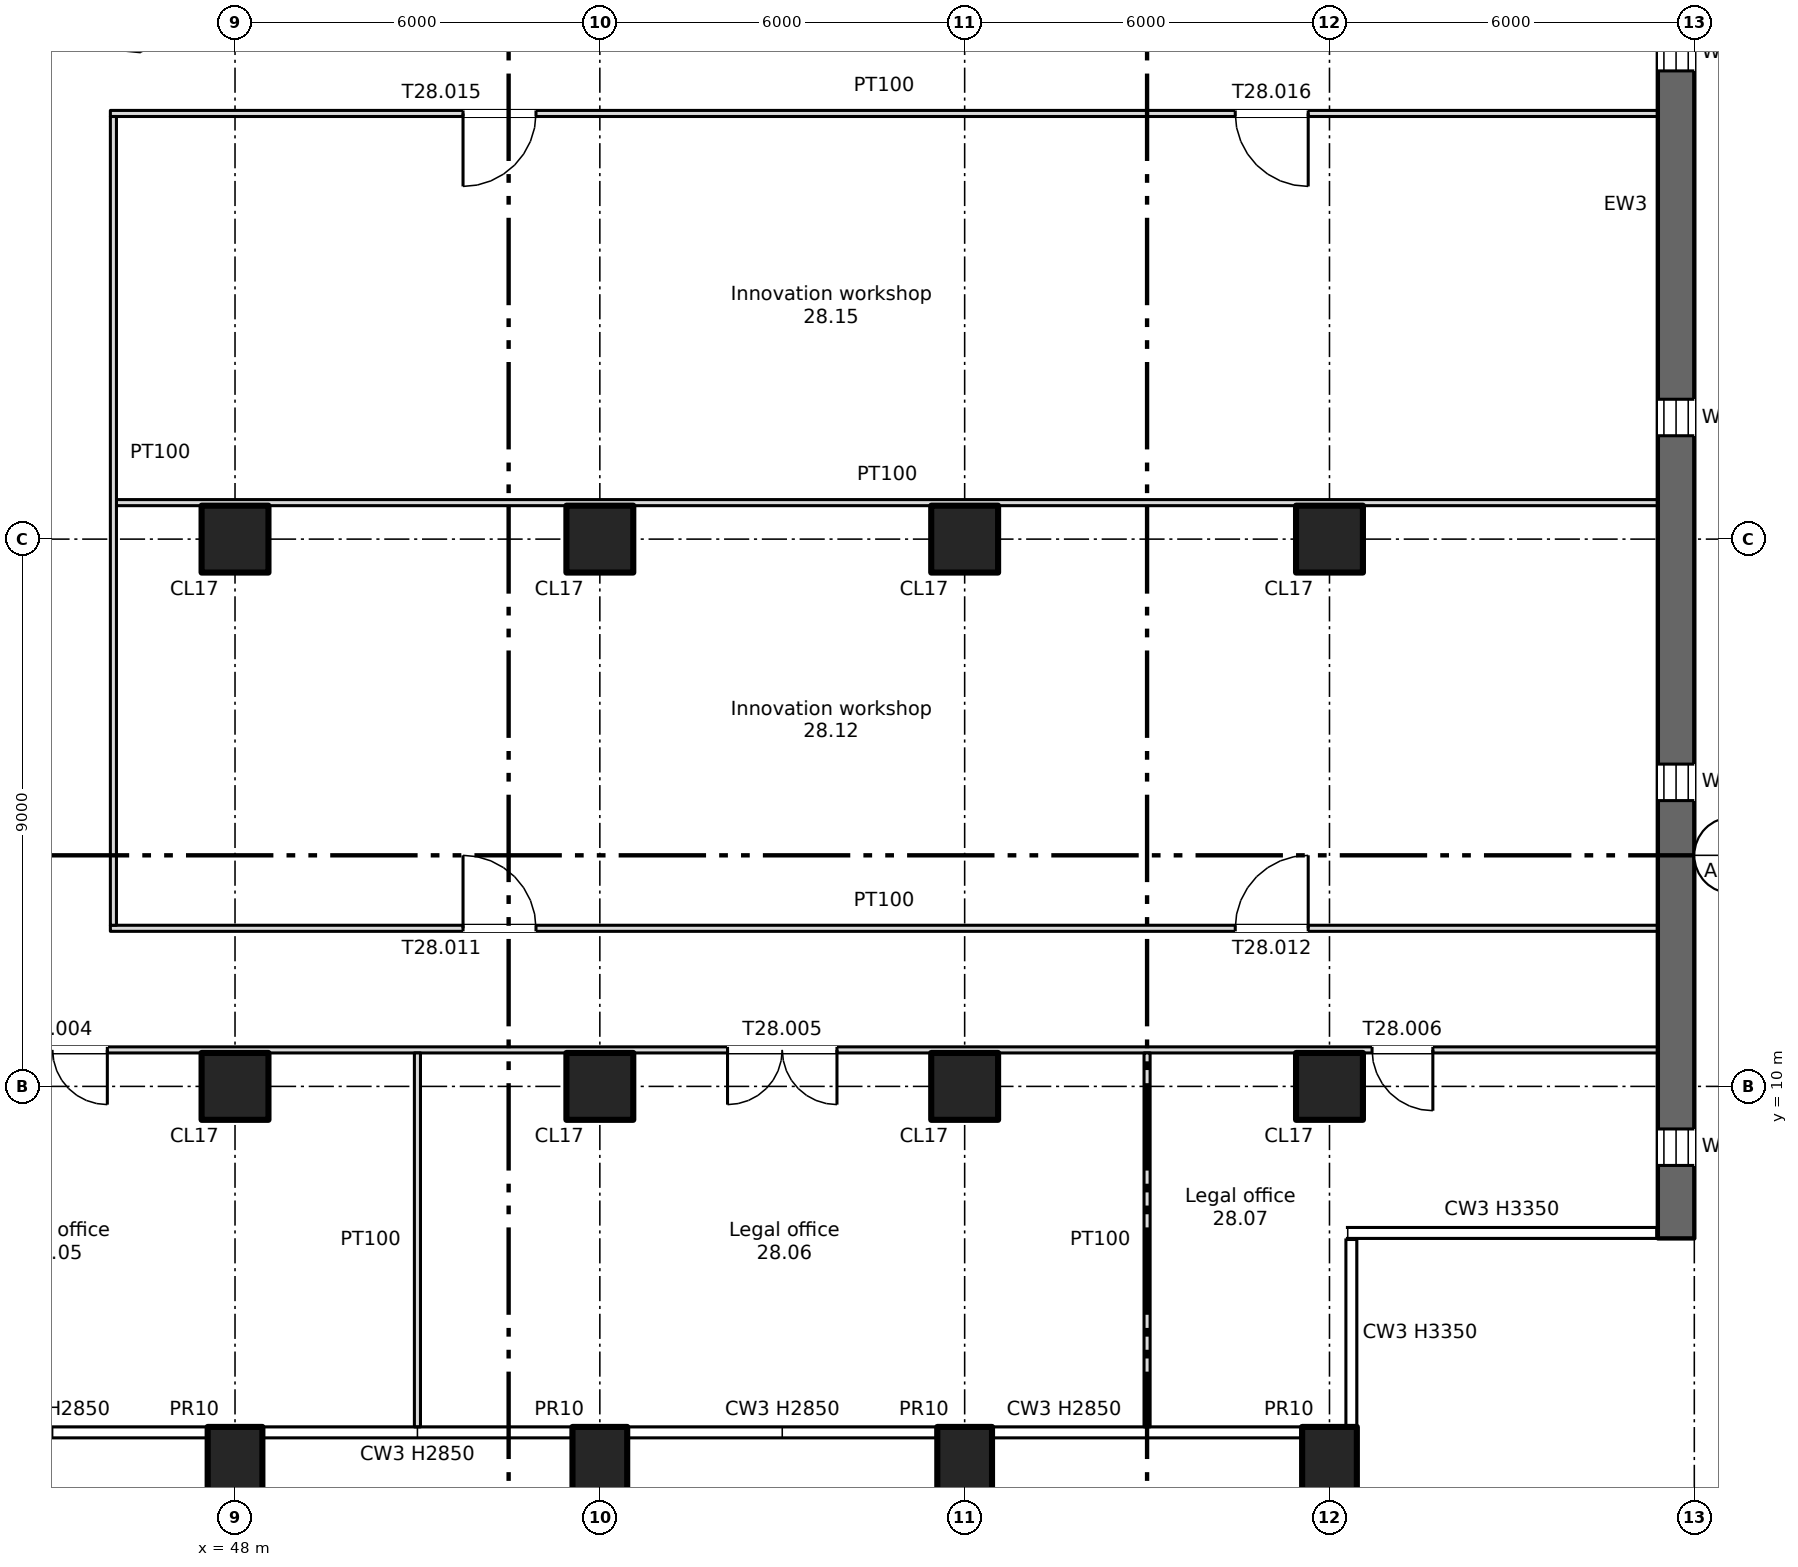
"""IFC4 building model, lengths in metres.
Left out: names, types, materials, properties, quantities, classifications, styles, units other than length and angle.
Written with IfcOpenShell. Run it as: python <this file> out.ifc"""

import sys

from ifc_helpers import new_model, si_unit, direction, frame, frame_2d, origin, origin_2d, place, context, subcontext, project, spatial, rectangle, extrude, element, fill, save


model = new_model("IFC4")
c1 = context("Model", 3, precision=1e-05, world=origin(), true_north=direction((0.0, 1.0)))
c2 = subcontext(c1, "Body", "Model", "MODEL_VIEW")
j1 = project(units=[si_unit("LENGTHUNIT", "METRE"), si_unit("PLANEANGLEUNIT", "RADIAN")], contexts=[c1])
p1 = place(None, origin())
s1 = spatial("IfcSite", under=j1, at=p1, CompositionType="ELEMENT")
p2 = place(p1, origin())
s2 = spatial("IfcBuilding", under=s1, at=p2, CompositionType="ELEMENT")
p3 = place(p2, frame((0.0, 0.0, 193.0)))
s3 = spatial("IfcBuildingStorey", under=s2, at=p3, CompositionType="ELEMENT", Elevation=193.0)
for number, where, z_axis, x_axis in (
    (1, (48.0, 3.7, -0.4), (0.0, 0.0, 1.0), (1.0, 0.0, 0.0)),
    (2, (54.0, 3.7, -0.4), (0.0, 0.0, 1.0), (1.0, 0.0, 0.0)),
    (3, (60.0, 3.7, -0.4), (0.0, 0.0, 1.0), (1.0, 0.0, 0.0)),
    (4, (66.0, 3.7, -0.4), (0.0, 0.0, 1.0), (1.0, 0.0, 0.0)),
):
    element("IfcColumn", number, at=place(p3, frame(where, z_axis=z_axis, x_axis=x_axis)), inside=s3, PredefinedType="COLUMN", context=c2, shape_type="SweptSolid", body=[
        extrude(rectangle(XDim=0.9, YDim=1.4, at=origin_2d()), origin(), (0.0, 0.0, 1.0), 3.75),
    ])
for number, where, z_axis, x_axis in (
    (5, (48.0, 10.0, 0.0), (0.0, 0.0, 1.0), (1.0, 0.0, 0.0)),
    (6, (48.0, 19.0, 0.0), (0.0, 0.0, 1.0), (1.0, 0.0, 0.0)),
    (7, (54.0, 10.0, 0.0), (0.0, 0.0, 1.0), (1.0, 0.0, 0.0)),
    (8, (54.0, 19.0, 0.0), (0.0, 0.0, 1.0), (1.0, 0.0, 0.0)),
    (9, (60.0, 10.0, 0.0), (0.0, 0.0, 1.0), (1.0, 0.0, 0.0)),
    (10, (60.0, 19.0, 0.0), (0.0, 0.0, 1.0), (1.0, 0.0, 0.0)),
    (11, (66.0, 10.0, 0.0), (0.0, 0.0, 1.0), (1.0, 0.0, 0.0)),
    (12, (66.0, 19.0, 0.0), (0.0, 0.0, 1.0), (1.0, 0.0, 0.0)),
):
    element("IfcColumn", number, at=place(p3, frame(where, z_axis=z_axis, x_axis=x_axis)), inside=s3, PredefinedType="COLUMN", context=c2, shape_type="SweptSolid", body=[
        extrude(rectangle(XDim=1.1, YDim=1.1, at=origin_2d()), origin(), (0.0, 0.0, 1.0), 3.35),
    ])
p4 = place(p3, frame((71.7, 7.5, 0.0), z_axis=(0.0, 0.0, 1.0), x_axis=(0.0, 1.0, 0.0)))
e13 = element("IfcWall", 13, at=p4, inside=s3, PredefinedType="SHEAR", context=c2, shape_type="SweptSolid", body=[
    extrude(rectangle(XDim=34.0, YDim=0.6, at=frame_2d((17.0, 0.0))), origin(), (0.0, 0.0, 1.0), 3.35),
])
p5 = place(p4, frame((1.2, 0.0, 0.6)))
e14 = element("IfcOpeningElement", 14, at=p5, cuts=e13, PredefinedType="OPENING", context=c2, shape_type="SweptSolid", body=[
    extrude(rectangle(XDim=0.6, YDim=2.4, at=frame_2d((0.3, 1.2))), frame((0.0, 0.31, 0.0), z_axis=(0.0, -1.0, 0.0), x_axis=(1.0, 0.0, 0.0)), (0.0, 0.0, 1.0), 0.62),
])
p6 = place(p4, frame((7.2, 0.0, 0.6)))
e15 = element("IfcOpeningElement", 15, at=p6, cuts=e13, PredefinedType="OPENING", context=c2, shape_type="SweptSolid", body=[
    extrude(rectangle(XDim=0.6, YDim=2.4, at=frame_2d((0.3, 1.2))), frame((0.0, 0.31, 0.0), z_axis=(0.0, -1.0, 0.0), x_axis=(1.0, 0.0, 0.0)), (0.0, 0.0, 1.0), 0.62),
])
p7 = place(p4, frame((13.2, 0.0, 0.6)))
e16 = element("IfcOpeningElement", 16, at=p7, cuts=e13, PredefinedType="OPENING", context=c2, shape_type="SweptSolid", body=[
    extrude(rectangle(XDim=0.6, YDim=2.4, at=frame_2d((0.3, 1.2))), frame((0.0, 0.31, 0.0), z_axis=(0.0, -1.0, 0.0), x_axis=(1.0, 0.0, 0.0)), (0.0, 0.0, 1.0), 0.62),
])
p8 = place(p4, frame((19.2, 0.0, 0.6)))
e17 = element("IfcOpeningElement", 17, at=p8, cuts=e13, PredefinedType="OPENING", context=c2, shape_type="SweptSolid", body=[
    extrude(rectangle(XDim=0.6, YDim=2.4, at=frame_2d((0.3, 1.2))), frame((0.0, 0.31, 0.0), z_axis=(0.0, -1.0, 0.0), x_axis=(1.0, 0.0, 0.0)), (0.0, 0.0, 1.0), 0.62),
])
p9 = place(p4, frame((25.2, 0.0, 0.6)))
e18 = element("IfcOpeningElement", 18, at=p9, cuts=e13, PredefinedType="OPENING", context=c2, shape_type="SweptSolid", body=[
    extrude(rectangle(XDim=0.6, YDim=2.4, at=frame_2d((0.3, 1.2))), frame((0.0, 0.31, 0.0), z_axis=(0.0, -1.0, 0.0), x_axis=(1.0, 0.0, 0.0)), (0.0, 0.0, 1.0), 0.62),
])
p10 = place(p4, frame((31.2, 0.0, 0.6)))
e19 = element("IfcOpeningElement", 19, at=p10, cuts=e13, PredefinedType="OPENING", context=c2, shape_type="SweptSolid", body=[
    extrude(rectangle(XDim=0.6, YDim=2.4, at=frame_2d((0.3, 1.2))), frame((0.0, 0.31, 0.0), z_axis=(0.0, -1.0, 0.0), x_axis=(1.0, 0.0, 0.0)), (0.0, 0.0, 1.0), 0.62),
])
p11 = place(p3, frame((6.6, 10.6, 0.0), z_axis=(0.0, 0.0, 1.0), x_axis=(1.0, 0.0, 0.0)))
e20 = element("IfcWall", 20, at=p11, inside=s3, PredefinedType="PARTITIONING", context=c2, shape_type="SweptSolid", body=[
    extrude(rectangle(XDim=64.8, YDim=0.1, at=frame_2d((32.4, 0.0))), origin(), (0.0, 0.0, 1.0), 3.35),
])
p12 = place(p11, frame((9.4, 0.0, 0.0)))
e21 = element("IfcOpeningElement", 21, at=p12, cuts=e20, PredefinedType="OPENING", context=c2, shape_type="SweptSolid", body=[
    extrude(rectangle(XDim=1.0, YDim=2.1, at=frame_2d((0.5, 1.05))), frame((0.0, 0.06, 0.0), z_axis=(0.0, -1.0, 0.0), x_axis=(1.0, 0.0, 0.0)), (0.0, 0.0, 1.0), 0.12),
])
p13 = place(p11, frame((19.5, 0.0, 0.0)))
e22 = element("IfcOpeningElement", 22, at=p13, cuts=e20, PredefinedType="OPENING", context=c2, shape_type="SweptSolid", body=[
    extrude(rectangle(XDim=1.8, YDim=2.1, at=frame_2d((0.9, 1.05))), frame((0.0, 0.06, 0.0), z_axis=(0.0, -1.0, 0.0), x_axis=(1.0, 0.0, 0.0)), (0.0, 0.0, 1.0), 0.12),
])
p14 = place(p11, frame((30.15, 0.0, 0.0)))
e23 = element("IfcOpeningElement", 23, at=p14, cuts=e20, PredefinedType="OPENING", context=c2, shape_type="SweptSolid", body=[
    extrude(rectangle(XDim=1.0, YDim=2.1, at=frame_2d((0.5, 1.05))), frame((0.0, 0.06, 0.0), z_axis=(0.0, -1.0, 0.0), x_axis=(1.0, 0.0, 0.0)), (0.0, 0.0, 1.0), 0.12),
])
p15 = place(p11, frame((37.5, 0.0, 0.0)))
e24 = element("IfcOpeningElement", 24, at=p15, cuts=e20, PredefinedType="OPENING", context=c2, shape_type="SweptSolid", body=[
    extrude(rectangle(XDim=1.8, YDim=2.1, at=frame_2d((0.9, 1.05))), frame((0.0, 0.06, 0.0), z_axis=(0.0, -1.0, 0.0), x_axis=(1.0, 0.0, 0.0)), (0.0, 0.0, 1.0), 0.12),
])
p16 = place(p11, frame((49.5, 0.0, 0.0)))
e25 = element("IfcOpeningElement", 25, at=p16, cuts=e20, PredefinedType="OPENING", context=c2, shape_type="SweptSolid", body=[
    extrude(rectangle(XDim=1.8, YDim=2.1, at=frame_2d((0.9, 1.05))), frame((0.0, 0.06, 0.0), z_axis=(0.0, -1.0, 0.0), x_axis=(1.0, 0.0, 0.0)), (0.0, 0.0, 1.0), 0.12),
])
p17 = place(p11, frame((60.1, 0.0, 0.0)))
e26 = element("IfcOpeningElement", 26, at=p17, cuts=e20, PredefinedType="OPENING", context=c2, shape_type="SweptSolid", body=[
    extrude(rectangle(XDim=1.0, YDim=2.1, at=frame_2d((0.5, 1.05))), frame((0.0, 0.06, 0.0), z_axis=(0.0, -1.0, 0.0), x_axis=(1.0, 0.0, 0.0)), (0.0, 0.0, 1.0), 0.12),
])
p18 = place(p11, frame((2.2, 0.0, 0.0)))
e27 = element("IfcOpeningElement", 27, at=p18, cuts=e20, PredefinedType="OPENING", context=c2, shape_type="SweptSolid", body=[
    extrude(rectangle(XDim=1.0, YDim=2.1, at=frame_2d((0.5, 1.05))), frame((0.0, 0.06, 0.0), z_axis=(0.0, -1.0, 0.0), x_axis=(1.0, 0.0, 0.0)), (0.0, 0.0, 1.0), 0.12),
])
p19 = place(p3, frame((45.95, 12.6, 0.0), z_axis=(0.0, 0.0, 1.0), x_axis=(1.0, 0.0, 0.0)))
e28 = element("IfcWall", 28, at=p19, inside=s3, PredefinedType="PARTITIONING", context=c2, shape_type="SweptSolid", body=[
    extrude(rectangle(XDim=25.45, YDim=0.1, at=frame_2d((12.725, 0.0))), origin(), (0.0, 0.0, 1.0), 3.35),
])
p20 = place(p19, frame((5.8, 0.0, 0.0)))
e29 = element("IfcOpeningElement", 29, at=p20, cuts=e28, PredefinedType="OPENING", context=c2, shape_type="SweptSolid", body=[
    extrude(rectangle(XDim=1.2, YDim=2.1, at=frame_2d((0.6, 1.05))), frame((0.0, 0.06, 0.0), z_axis=(0.0, -1.0, 0.0), x_axis=(1.0, 0.0, 0.0)), (0.0, 0.0, 1.0), 0.12),
])
p21 = place(p19, frame((18.5, 0.0, 0.0)))
e30 = element("IfcOpeningElement", 30, at=p21, cuts=e28, PredefinedType="OPENING", context=c2, shape_type="SweptSolid", body=[
    extrude(rectangle(XDim=1.2, YDim=2.1, at=frame_2d((0.6, 1.05))), frame((0.0, 0.06, 0.0), z_axis=(0.0, -1.0, 0.0), x_axis=(1.0, 0.0, 0.0)), (0.0, 0.0, 1.0), 0.12),
])
p22 = place(p3, frame((46.05, 19.6, 0.0), z_axis=(0.0, 0.0, 1.0), x_axis=(1.0, 0.0, 0.0)))
e31 = element("IfcWall", 31, at=p22, inside=s3, PredefinedType="PARTITIONING", context=c2, shape_type="SweptSolid", body=[
    extrude(rectangle(XDim=25.35, YDim=0.1, at=frame_2d((12.675, 0.0))), origin(), (0.0, 0.0, 1.0), 3.35),
])
p23 = place(p3, frame((45.95, 26.0, 0.0), z_axis=(0.0, 0.0, 1.0), x_axis=(1.0, 0.0, 0.0)))
e32 = element("IfcWall", 32, at=p23, inside=s3, PredefinedType="PARTITIONING", context=c2, shape_type="SweptSolid", body=[
    extrude(rectangle(XDim=25.45, YDim=0.1, at=frame_2d((12.725, 0.0))), origin(), (0.0, 0.0, 1.0), 3.35),
])
p24 = place(p23, frame((5.8, 0.0, 0.0)))
e33 = element("IfcOpeningElement", 33, at=p24, cuts=e32, PredefinedType="OPENING", context=c2, shape_type="SweptSolid", body=[
    extrude(rectangle(XDim=1.2, YDim=2.1, at=frame_2d((0.6, 1.05))), frame((0.0, 0.06, 0.0), z_axis=(0.0, -1.0, 0.0), x_axis=(1.0, 0.0, 0.0)), (0.0, 0.0, 1.0), 0.12),
])
p25 = place(p23, frame((18.5, 0.0, 0.0)))
e34 = element("IfcOpeningElement", 34, at=p25, cuts=e32, PredefinedType="OPENING", context=c2, shape_type="SweptSolid", body=[
    extrude(rectangle(XDim=1.2, YDim=2.1, at=frame_2d((0.6, 1.05))), frame((0.0, 0.06, 0.0), z_axis=(0.0, -1.0, 0.0), x_axis=(1.0, 0.0, 0.0)), (0.0, 0.0, 1.0), 0.12),
])
p26 = place(p3, frame((46.0, 12.65, 0.0), z_axis=(0.0, 0.0, 1.0), x_axis=(0.0, 1.0, 0.0)))
e35 = element("IfcWall", 35, at=p26, inside=s3, PredefinedType="PARTITIONING", context=c2, shape_type="SweptSolid", body=[
    extrude(rectangle(XDim=13.3, YDim=0.1, at=frame_2d((6.65, 0.0))), origin(), (0.0, 0.0, 1.0), 3.35),
])
for number, where, z_axis, x_axis in (
    (36, (51.0, 4.4, 0.0), (0.0, 0.0, 1.0), (0.0, 1.0, 0.0)),
    (37, (63.0, 4.4, 0.0), (0.0, 0.0, 1.0), (0.0, 1.0, 0.0)),
):
    element("IfcWall", number, at=place(p3, frame(where, z_axis=z_axis, x_axis=x_axis)), inside=s3, PredefinedType="PARTITIONING", context=c2, shape_type="SweptSolid", body=[
        extrude(rectangle(XDim=6.15, YDim=0.1, at=frame_2d((3.075, 0.0))), origin(), (0.0, 0.0, 1.0), 3.35),
    ])
p27 = place(p5, origin())
e38 = element("IfcWindow", 38, at=p27, inside=s3, PartitioningType="SINGLE_PANEL", PredefinedType="WINDOW", context=c2, shape_type="SweptSolid", body=[
    extrude(rectangle(XDim=0.6, YDim=2.4, at=frame_2d((0.3, 1.2))), frame((0.0, 0.03, 0.0), z_axis=(0.0, -1.0, 0.0), x_axis=(1.0, 0.0, 0.0)), (0.0, 0.0, 1.0), 0.06),
])
fill(e14, e38)
p28 = place(p6, origin())
e39 = element("IfcWindow", 39, at=p28, inside=s3, PartitioningType="SINGLE_PANEL", PredefinedType="WINDOW", context=c2, shape_type="SweptSolid", body=[
    extrude(rectangle(XDim=0.6, YDim=2.4, at=frame_2d((0.3, 1.2))), frame((0.0, 0.03, 0.0), z_axis=(0.0, -1.0, 0.0), x_axis=(1.0, 0.0, 0.0)), (0.0, 0.0, 1.0), 0.06),
])
fill(e15, e39)
p29 = place(p7, origin())
e40 = element("IfcWindow", 40, at=p29, inside=s3, PartitioningType="SINGLE_PANEL", PredefinedType="WINDOW", context=c2, shape_type="SweptSolid", body=[
    extrude(rectangle(XDim=0.6, YDim=2.4, at=frame_2d((0.3, 1.2))), frame((0.0, 0.03, 0.0), z_axis=(0.0, -1.0, 0.0), x_axis=(1.0, 0.0, 0.0)), (0.0, 0.0, 1.0), 0.06),
])
fill(e16, e40)
p30 = place(p8, origin())
e41 = element("IfcWindow", 41, at=p30, inside=s3, PartitioningType="SINGLE_PANEL", PredefinedType="WINDOW", context=c2, shape_type="SweptSolid", body=[
    extrude(rectangle(XDim=0.6, YDim=2.4, at=frame_2d((0.3, 1.2))), frame((0.0, 0.03, 0.0), z_axis=(0.0, -1.0, 0.0), x_axis=(1.0, 0.0, 0.0)), (0.0, 0.0, 1.0), 0.06),
])
fill(e17, e41)
p31 = place(p15, origin())
e42 = element("IfcDoor", 42, at=p31, inside=s3, OperationType="DOUBLE_DOOR_SINGLE_SWING", PredefinedType="DOOR", context=c2, shape_type="SweptSolid", body=[
    extrude(rectangle(XDim=1.8, YDim=2.1, at=frame_2d((0.9, 1.05))), frame((0.0, 0.025, 0.0), z_axis=(0.0, -1.0, 0.0), x_axis=(1.0, 0.0, 0.0)), (0.0, 0.0, 1.0), 0.05),
])
fill(e24, e42)
p32 = place(p16, origin())
e43 = element("IfcDoor", 43, at=p32, inside=s3, OperationType="DOUBLE_DOOR_SINGLE_SWING", PredefinedType="DOOR", context=c2, shape_type="SweptSolid", body=[
    extrude(rectangle(XDim=1.8, YDim=2.1, at=frame_2d((0.9, 1.05))), frame((0.0, 0.025, 0.0), z_axis=(0.0, -1.0, 0.0), x_axis=(1.0, 0.0, 0.0)), (0.0, 0.0, 1.0), 0.05),
])
fill(e25, e43)
p33 = place(p17, origin())
e44 = element("IfcDoor", 44, at=p33, inside=s3, OperationType="SINGLE_SWING_RIGHT", PredefinedType="DOOR", context=c2, shape_type="SweptSolid", body=[
    extrude(rectangle(XDim=1.0, YDim=2.1, at=frame_2d((0.5, 1.05))), frame((0.0, 0.025, 0.0), z_axis=(0.0, -1.0, 0.0), x_axis=(1.0, 0.0, 0.0)), (0.0, 0.0, 1.0), 0.05),
])
fill(e26, e44)
p34 = place(p20, origin())
e45 = element("IfcDoor", 45, at=p34, inside=s3, OperationType="SINGLE_SWING_LEFT", PredefinedType="DOOR", context=c2, shape_type="SweptSolid", body=[
    extrude(rectangle(XDim=1.2, YDim=2.1, at=frame_2d((0.6, 1.05))), frame((0.0, 0.025, 0.0), z_axis=(0.0, -1.0, 0.0), x_axis=(1.0, 0.0, 0.0)), (0.0, 0.0, 1.0), 0.05),
])
fill(e29, e45)
p35 = place(p21, origin())
e46 = element("IfcDoor", 46, at=p35, inside=s3, OperationType="SINGLE_SWING_RIGHT", PredefinedType="DOOR", context=c2, shape_type="SweptSolid", body=[
    extrude(rectangle(XDim=1.2, YDim=2.1, at=frame_2d((0.6, 1.05))), frame((0.0, 0.025, 0.0), z_axis=(0.0, -1.0, 0.0), x_axis=(1.0, 0.0, 0.0)), (0.0, 0.0, 1.0), 0.05),
])
fill(e30, e46)
p36 = place(p24, origin())
e47 = element("IfcDoor", 47, at=p36, inside=s3, OperationType="SINGLE_SWING_LEFT", PredefinedType="DOOR", context=c2, shape_type="SweptSolid", body=[
    extrude(rectangle(XDim=1.2, YDim=2.1, at=frame_2d((0.6, 1.05))), frame((0.0, 0.025, 0.0), z_axis=(0.0, -1.0, 0.0), x_axis=(1.0, 0.0, 0.0)), (0.0, 0.0, 1.0), 0.05),
])
fill(e33, e47)
p37 = place(p25, origin())
e48 = element("IfcDoor", 48, at=p37, inside=s3, OperationType="SINGLE_SWING_RIGHT", PredefinedType="DOOR", context=c2, shape_type="SweptSolid", body=[
    extrude(rectangle(XDim=1.2, YDim=2.1, at=frame_2d((0.6, 1.05))), frame((0.0, 0.025, 0.0), z_axis=(0.0, -1.0, 0.0), x_axis=(1.0, 0.0, 0.0)), (0.0, 0.0, 1.0), 0.05),
])
fill(e34, e48)
save(model, sys.argv[1])
